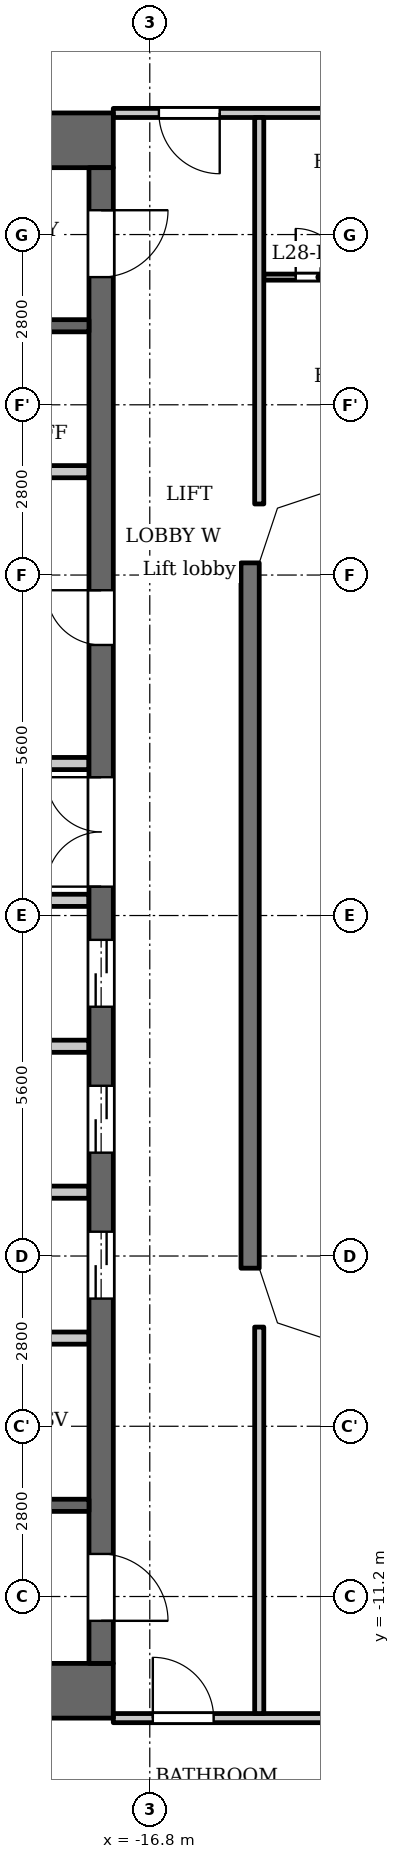
"""IFC4 building model, lengths in metres.
Left out: names, types, materials, properties, quantities, classifications, styles, units other than length and angle.
Written with IfcOpenShell. Run it as: python <this file> out.ifc"""

import sys

from ifc_helpers import new_model, si_unit, direction, frame, frame_2d, origin, place, context, subcontext, project, spatial, polyline, rectangle, outline, extrude, element, fill, save


model = new_model("IFC4")
c1 = context("Model", 3, precision=1e-05, world=origin(), true_north=direction((0.0, 1.0)))
c2 = subcontext(c1, "Body", "Model", "MODEL_VIEW")
j1 = project(units=[si_unit("LENGTHUNIT", "METRE"), si_unit("PLANEANGLEUNIT", "RADIAN")], contexts=[c1])
p1 = place(None, origin())
s1 = spatial("IfcSite", under=j1, at=p1, CompositionType="ELEMENT")
p2 = place(p1, origin())
s2 = spatial("IfcBuilding", under=s1, at=p2, CompositionType="ELEMENT")
p3 = place(p2, frame((0.0, 0.0, 111.3)))
s3 = spatial("IfcBuildingStorey", under=s2, at=p3, CompositionType="ELEMENT", Elevation=111.3)
p4 = place(p3, frame((-15.15, -5.8, 0.0), z_axis=(0.0, 0.0, 1.0), x_axis=(0.0, 1.0, 0.0)))
e1 = element("IfcWall", 1, at=p4, inside=s3, PredefinedType="SOLIDWALL", context=c2, shape_type="SweptSolid", body=[
    extrude(rectangle(XDim=11.6, YDim=0.3, at=frame_2d((5.8, 0.0))), origin(), (0.0, 0.0, 1.0), 3.2),
])
for number, where, z_axis, x_axis in (
    (2, (-17.4, 12.75, 0.0), (0.0, 0.0, 1.0), (-1.0, 0.0, 0.0)),
    (3, (-17.4, -12.75, 0.0), (0.0, 0.0, 1.0), (-1.0, 0.0, 0.0)),
):
    element("IfcWall", number, at=place(p3, frame(where, z_axis=z_axis, x_axis=x_axis)), inside=s3, PredefinedType="SHEAR", context=c2, shape_type="SweptSolid", body=[
        extrude(rectangle(XDim=10.4, YDim=0.9, at=frame_2d((5.2, 0.0))), origin(), (0.0, 0.0, 1.0), 3.2),
    ])
p5 = place(p3, frame((-17.6, -12.3, 0.0), z_axis=(0.0, 0.0, 1.0), x_axis=(0.0, 1.0, 0.0)))
e4 = element("IfcWall", 4, at=p5, inside=s3, PredefinedType="SHEAR", context=c2, shape_type="SweptSolid", body=[
    extrude(rectangle(XDim=24.6, YDim=0.4, at=frame_2d((12.3, 0.0))), origin(), (0.0, 0.0, 1.0), 3.2),
])
p6 = place(p5, frame((6.0, 0.0, 0.0)))
e5 = element("IfcOpeningElement", 5, at=p6, cuts=e4, PredefinedType="OPENING", context=c2, shape_type="SweptSolid", body=[
    extrude(rectangle(XDim=1.1, YDim=2.1, at=frame_2d((0.55, 1.05))), frame((0.0, 0.21, 0.0), z_axis=(0.0, -1.0, 0.0), x_axis=(1.0, 0.0, 0.0)), (0.0, 0.0, 1.0), 0.42),
])
p7 = place(p5, frame((8.4, 0.0, 0.0)))
e6 = element("IfcOpeningElement", 6, at=p7, cuts=e4, PredefinedType="OPENING", context=c2, shape_type="SweptSolid", body=[
    extrude(rectangle(XDim=1.1, YDim=2.1, at=frame_2d((0.55, 1.05))), frame((0.0, 0.21, 0.0), z_axis=(0.0, -1.0, 0.0), x_axis=(1.0, 0.0, 0.0)), (0.0, 0.0, 1.0), 0.42),
])
p8 = place(p5, frame((10.8, 0.0, 0.0)))
e7 = element("IfcOpeningElement", 7, at=p8, cuts=e4, PredefinedType="OPENING", context=c2, shape_type="SweptSolid", body=[
    extrude(rectangle(XDim=1.1, YDim=2.1, at=frame_2d((0.55, 1.05))), frame((0.0, 0.21, 0.0), z_axis=(0.0, -1.0, 0.0), x_axis=(1.0, 0.0, 0.0)), (0.0, 0.0, 1.0), 0.42),
])
p9 = place(p5, frame((16.75, 0.0, 0.0)))
e8 = element("IfcOpeningElement", 8, at=p9, cuts=e4, PredefinedType="OPENING", context=c2, shape_type="SweptSolid", body=[
    extrude(rectangle(XDim=0.9, YDim=2.1, at=frame_2d((0.45, 1.05))), frame((0.0, 0.21, 0.0), z_axis=(0.0, -1.0, 0.0), x_axis=(1.0, 0.0, 0.0)), (0.0, 0.0, 1.0), 0.42),
])
p10 = place(p5, frame((22.8, 0.0, 0.0)))
e9 = element("IfcOpeningElement", 9, at=p10, cuts=e4, PredefinedType="OPENING", context=c2, shape_type="SweptSolid", body=[
    extrude(rectangle(XDim=1.1, YDim=2.1, at=frame_2d((0.55, 1.05))), frame((0.0, 0.21, 0.0), z_axis=(0.0, -1.0, 0.0), x_axis=(1.0, 0.0, 0.0)), (0.0, 0.0, 1.0), 0.42),
])
p11 = place(p5, frame((0.7, 0.0, 0.0)))
e10 = element("IfcOpeningElement", 10, at=p11, cuts=e4, PredefinedType="OPENING", context=c2, shape_type="SweptSolid", body=[
    extrude(rectangle(XDim=1.1, YDim=2.1, at=frame_2d((0.55, 1.05))), frame((0.0, 0.21, 0.0), z_axis=(0.0, -1.0, 0.0), x_axis=(1.0, 0.0, 0.0)), (0.0, 0.0, 1.0), 0.42),
])
p12 = place(p5, frame((12.775, 0.0, 0.0)))
e11 = element("IfcOpeningElement", 11, at=p12, cuts=e4, PredefinedType="OPENING", context=c2, shape_type="SweptSolid", body=[
    extrude(rectangle(XDim=1.8, YDim=2.1, at=frame_2d((0.9, 1.05))), frame((0.0, 0.21, 0.0), z_axis=(0.0, -1.0, 0.0), x_axis=(1.0, 0.0, 0.0)), (0.0, 0.0, 1.0), 0.42),
])
p13 = place(p3, frame((-17.8, -9.7, 0.0), z_axis=(0.0, 0.0, 1.0), x_axis=(-1.0, 0.0, 0.0)))
e12 = element("IfcWall", 12, at=p13, inside=s3, PredefinedType="SHEAR", context=c2, shape_type="SweptSolid", body=[
    extrude(rectangle(XDim=8.3, YDim=0.2, at=frame_2d((4.15, 0.0))), origin(), (0.0, 0.0, 1.0), 3.2),
])
p14 = place(p13, frame((0.85, 0.0, 0.0)))
e13 = element("IfcOpeningElement", 13, at=p14, cuts=e12, PredefinedType="OPENING", context=c2, shape_type="SweptSolid", body=[
    extrude(rectangle(XDim=1.1, YDim=2.1, at=frame_2d((0.55, 1.05))), frame((0.0, 0.11, 0.0), z_axis=(0.0, -1.0, 0.0), x_axis=(1.0, 0.0, 0.0)), (0.0, 0.0, 1.0), 0.22),
])
p15 = place(p13, frame((3.75, 0.0, 0.0)))
e14 = element("IfcOpeningElement", 14, at=p15, cuts=e12, PredefinedType="OPENING", context=c2, shape_type="SweptSolid", body=[
    extrude(rectangle(XDim=1.1, YDim=2.1, at=frame_2d((0.55, 1.05))), frame((0.0, 0.11, 0.0), z_axis=(0.0, -1.0, 0.0), x_axis=(1.0, 0.0, 0.0)), (0.0, 0.0, 1.0), 0.22),
])
for number, where, z_axis, x_axis in (
    (15, (-17.8, -6.95, 0.0), (0.0, 0.0, 1.0), (-1.0, 0.0, 0.0)),
    (16, (-17.8, -4.55, 0.0), (0.0, 0.0, 1.0), (-1.0, 0.0, 0.0)),
    (17, (-17.8, -2.15, 0.0), (0.0, 0.0, 1.0), (-1.0, 0.0, 0.0)),
):
    element("IfcWall", number, at=place(p3, frame(where, z_axis=z_axis, x_axis=x_axis)), inside=s3, PredefinedType="PARTITIONING", context=c2, shape_type="SweptSolid", body=[
        extrude(rectangle(XDim=2.8, YDim=0.2, at=frame_2d((1.4, 0.0))), origin(), (0.0, 0.0, 1.0), 3.2),
    ])
for number, where, z_axis, x_axis in (
    (18, (-17.8, 0.25, 0.0), (0.0, 0.0, 1.0), (-1.0, 0.0, 0.0)),
    (19, (-17.8, 2.5, 0.0), (0.0, 0.0, 1.0), (-1.0, 0.0, 0.0)),
):
    element("IfcWall", number, at=place(p3, frame(where, z_axis=z_axis, x_axis=x_axis)), inside=s3, PredefinedType="PARTITIONING", context=c2, shape_type="SweptSolid", body=[
        extrude(rectangle(XDim=3.0, YDim=0.2, at=frame_2d((1.5, 0.0))), origin(), (0.0, 0.0, 1.0), 3.2),
    ])
p16 = place(p3, frame((-17.8, 7.3, 0.0), z_axis=(0.0, 0.0, 1.0), x_axis=(-1.0, 0.0, 0.0)))
e20 = element("IfcWall", 20, at=p16, inside=s3, PredefinedType="PARTITIONING", context=c2, shape_type="SweptSolid", body=[
    extrude(rectangle(XDim=2.8, YDim=0.2, at=frame_2d((1.4, 0.0))), origin(), (0.0, 0.0, 1.0), 3.2),
])
p17 = place(p3, frame((-17.8, 9.7, 0.0), z_axis=(0.0, 0.0, 1.0), x_axis=(-1.0, 0.0, 0.0)))
e21 = element("IfcWall", 21, at=p17, inside=s3, PredefinedType="SHEAR", context=c2, shape_type="SweptSolid", body=[
    extrude(rectangle(XDim=8.3, YDim=0.2, at=frame_2d((4.15, 0.0))), origin(), (0.0, 0.0, 1.0), 3.2),
])
p18 = place(p17, frame((0.85, 0.0, 0.0)))
e22 = element("IfcOpeningElement", 22, at=p18, cuts=e21, PredefinedType="OPENING", context=c2, shape_type="SweptSolid", body=[
    extrude(rectangle(XDim=1.1, YDim=2.1, at=frame_2d((0.55, 1.05))), frame((0.0, 0.11, 0.0), z_axis=(0.0, -1.0, 0.0), x_axis=(1.0, 0.0, 0.0)), (0.0, 0.0, 1.0), 0.22),
])
p19 = place(p17, frame((3.75, 0.0, 0.0)))
e23 = element("IfcOpeningElement", 23, at=p19, cuts=e21, PredefinedType="OPENING", context=c2, shape_type="SweptSolid", body=[
    extrude(rectangle(XDim=1.1, YDim=2.1, at=frame_2d((0.55, 1.05))), frame((0.0, 0.11, 0.0), z_axis=(0.0, -1.0, 0.0), x_axis=(1.0, 0.0, 0.0)), (0.0, 0.0, 1.0), 0.22),
])
p20 = place(p3, frame((-17.4, -13.2, 0.0), z_axis=(0.0, 0.0, 1.0), x_axis=(1.0, 0.0, 0.0)))
e24 = element("IfcWall", 24, at=p20, inside=s3, PredefinedType="PARTITIONING", context=c2, shape_type="SweptSolid", body=[
    extrude(rectangle(XDim=34.8, YDim=0.15, at=frame_2d((17.4, 0.0))), origin(), (0.0, 0.0, 1.0), 3.2),
])
p21 = place(p20, frame((0.65, 0.0, 0.0)))
e25 = element("IfcOpeningElement", 25, at=p21, cuts=e24, PredefinedType="OPENING", context=c2, shape_type="SweptSolid", body=[
    extrude(rectangle(XDim=1.0, YDim=2.1, at=frame_2d((0.5, 1.05))), frame((0.0, 0.085, 0.0), z_axis=(0.0, -1.0, 0.0), x_axis=(1.0, 0.0, 0.0)), (0.0, 0.0, 1.0), 0.17),
])
p22 = place(p20, frame((33.05, 0.0, 0.0)))
e26 = element("IfcOpeningElement", 26, at=p22, cuts=e24, PredefinedType="OPENING", context=c2, shape_type="SweptSolid", body=[
    extrude(rectangle(XDim=1.0, YDim=2.1, at=frame_2d((0.5, 1.05))), frame((0.0, 0.085, 0.0), z_axis=(0.0, -1.0, 0.0), x_axis=(1.0, 0.0, 0.0)), (0.0, 0.0, 1.0), 0.17),
])
p23 = place(p20, frame((4.55, 0.0, 0.0)))
e27 = element("IfcOpeningElement", 27, at=p23, cuts=e24, PredefinedType="OPENING", context=c2, shape_type="SweptSolid", body=[
    extrude(rectangle(XDim=1.0, YDim=2.1, at=frame_2d((0.5, 1.05))), frame((0.0, 0.085, 0.0), z_axis=(0.0, -1.0, 0.0), x_axis=(1.0, 0.0, 0.0)), (0.0, 0.0, 1.0), 0.17),
])
p24 = place(p20, frame((6.9, 0.0, 0.0)))
e28 = element("IfcOpeningElement", 28, at=p24, cuts=e24, PredefinedType="OPENING", context=c2, shape_type="SweptSolid", body=[
    extrude(rectangle(XDim=1.0, YDim=2.1, at=frame_2d((0.5, 1.05))), frame((0.0, 0.085, 0.0), z_axis=(0.0, -1.0, 0.0), x_axis=(1.0, 0.0, 0.0)), (0.0, 0.0, 1.0), 0.17),
])
p25 = place(p20, frame((15.75, 0.0, 0.0)))
e29 = element("IfcOpeningElement", 29, at=p25, cuts=e24, PredefinedType="OPENING", context=c2, shape_type="SweptSolid", body=[
    extrude(rectangle(XDim=1.0, YDim=2.1, at=frame_2d((0.5, 1.05))), frame((0.0, 0.085, 0.0), z_axis=(0.0, -1.0, 0.0), x_axis=(1.0, 0.0, 0.0)), (0.0, 0.0, 1.0), 0.17),
])
p26 = place(p20, frame((18.1, 0.0, 0.0)))
e30 = element("IfcOpeningElement", 30, at=p26, cuts=e24, PredefinedType="OPENING", context=c2, shape_type="SweptSolid", body=[
    extrude(rectangle(XDim=1.0, YDim=2.1, at=frame_2d((0.5, 1.05))), frame((0.0, 0.085, 0.0), z_axis=(0.0, -1.0, 0.0), x_axis=(1.0, 0.0, 0.0)), (0.0, 0.0, 1.0), 0.17),
])
p27 = place(p20, frame((26.95, 0.0, 0.0)))
e31 = element("IfcOpeningElement", 31, at=p27, cuts=e24, PredefinedType="OPENING", context=c2, shape_type="SweptSolid", body=[
    extrude(rectangle(XDim=1.0, YDim=2.1, at=frame_2d((0.5, 1.05))), frame((0.0, 0.085, 0.0), z_axis=(0.0, -1.0, 0.0), x_axis=(1.0, 0.0, 0.0)), (0.0, 0.0, 1.0), 0.17),
])
p28 = place(p20, frame((29.25, 0.0, 0.0)))
e32 = element("IfcOpeningElement", 32, at=p28, cuts=e24, PredefinedType="OPENING", context=c2, shape_type="SweptSolid", body=[
    extrude(rectangle(XDim=1.0, YDim=2.1, at=frame_2d((0.5, 1.05))), frame((0.0, 0.085, 0.0), z_axis=(0.0, -1.0, 0.0), x_axis=(1.0, 0.0, 0.0)), (0.0, 0.0, 1.0), 0.17),
])
p29 = place(p3, frame((-14.925, 10.5, 0.0), z_axis=(0.0, 0.0, 1.0), x_axis=(1.0, 0.0, 0.0)))
e33 = element("IfcWall", 33, at=p29, inside=s3, PredefinedType="PARTITIONING", context=c2, shape_type="SweptSolid", body=[
    extrude(rectangle(XDim=29.85, YDim=0.1, at=frame_2d((14.925, 0.0))), origin(), (0.0, 0.0, 1.0), 3.2),
])
p30 = place(p29, frame((0.525, 0.0, 0.0)))
e34 = element("IfcOpeningElement", 34, at=p30, cuts=e33, PredefinedType="OPENING", context=c2, shape_type="SweptSolid", body=[
    extrude(rectangle(XDim=0.8, YDim=2.1, at=frame_2d((0.4, 1.05))), frame((0.0, 0.06, 0.0), z_axis=(0.0, -1.0, 0.0), x_axis=(1.0, 0.0, 0.0)), (0.0, 0.0, 1.0), 0.12),
])
p31 = place(p29, frame((4.375, 0.0, 0.0)))
e35 = element("IfcOpeningElement", 35, at=p31, cuts=e33, PredefinedType="OPENING", context=c2, shape_type="SweptSolid", body=[
    extrude(rectangle(XDim=0.9, YDim=2.1, at=frame_2d((0.45, 1.05))), frame((0.0, 0.06, 0.0), z_axis=(0.0, -1.0, 0.0), x_axis=(1.0, 0.0, 0.0)), (0.0, 0.0, 1.0), 0.12),
])
p32 = place(p29, frame((18.825, 0.0, 0.0)))
e36 = element("IfcOpeningElement", 36, at=p32, cuts=e33, PredefinedType="OPENING", context=c2, shape_type="SweptSolid", body=[
    extrude(rectangle(XDim=0.8, YDim=2.1, at=frame_2d((0.4, 1.05))), frame((0.0, 0.06, 0.0), z_axis=(0.0, -1.0, 0.0), x_axis=(1.0, 0.0, 0.0)), (0.0, 0.0, 1.0), 0.12),
])
p33 = place(p29, frame((16.325, 0.0, 0.0)))
e37 = element("IfcOpeningElement", 37, at=p33, cuts=e33, PredefinedType="OPENING", context=c2, shape_type="SweptSolid", body=[
    extrude(rectangle(XDim=0.9, YDim=2.1, at=frame_2d((0.45, 1.05))), frame((0.0, 0.06, 0.0), z_axis=(0.0, -1.0, 0.0), x_axis=(1.0, 0.0, 0.0)), (0.0, 0.0, 1.0), 0.12),
])
p34 = place(p29, frame((10.225, 0.0, 0.0)))
e38 = element("IfcOpeningElement", 38, at=p34, cuts=e33, PredefinedType="OPENING", context=c2, shape_type="SweptSolid", body=[
    extrude(rectangle(XDim=0.9, YDim=2.1, at=frame_2d((0.45, 1.05))), frame((0.0, 0.06, 0.0), z_axis=(0.0, -1.0, 0.0), x_axis=(1.0, 0.0, 0.0)), (0.0, 0.0, 1.0), 0.12),
])
p35 = place(p29, frame((13.325, 0.0, 0.0)))
e39 = element("IfcOpeningElement", 39, at=p35, cuts=e33, PredefinedType="OPENING", context=c2, shape_type="SweptSolid", body=[
    extrude(rectangle(XDim=0.9, YDim=2.1, at=frame_2d((0.45, 1.05))), frame((0.0, 0.06, 0.0), z_axis=(0.0, -1.0, 0.0), x_axis=(1.0, 0.0, 0.0)), (0.0, 0.0, 1.0), 0.12),
])
p36 = place(p29, frame((21.175, 0.0, 0.0)))
e40 = element("IfcOpeningElement", 40, at=p36, cuts=e33, PredefinedType="OPENING", context=c2, shape_type="SweptSolid", body=[
    extrude(rectangle(XDim=0.8, YDim=2.1, at=frame_2d((0.4, 1.05))), frame((0.0, 0.06, 0.0), z_axis=(0.0, -1.0, 0.0), x_axis=(1.0, 0.0, 0.0)), (0.0, 0.0, 1.0), 0.12),
])
p37 = place(p29, frame((26.775, 0.0, 0.0)))
e41 = element("IfcOpeningElement", 41, at=p37, cuts=e33, PredefinedType="OPENING", context=c2, shape_type="SweptSolid", body=[
    extrude(rectangle(XDim=0.9, YDim=2.1, at=frame_2d((0.45, 1.05))), frame((0.0, 0.06, 0.0), z_axis=(0.0, -1.0, 0.0), x_axis=(1.0, 0.0, 0.0)), (0.0, 0.0, 1.0), 0.12),
])
p38 = place(p3, frame((-17.4, 13.2, 0.0), z_axis=(0.0, 0.0, 1.0), x_axis=(1.0, 0.0, 0.0)))
e42 = element("IfcWall", 42, at=p38, inside=s3, PredefinedType="PARTITIONING", context=c2, shape_type="SweptSolid", body=[
    extrude(rectangle(XDim=34.8, YDim=0.15, at=frame_2d((17.4, 0.0))), origin(), (0.0, 0.0, 1.0), 3.2),
])
p39 = place(p38, frame((0.75, 0.0, 0.0)))
e43 = element("IfcOpeningElement", 43, at=p39, cuts=e42, PredefinedType="OPENING", context=c2, shape_type="SweptSolid", body=[
    extrude(rectangle(XDim=1.0, YDim=2.1, at=frame_2d((0.5, 1.05))), frame((0.0, 0.085, 0.0), z_axis=(0.0, -1.0, 0.0), x_axis=(1.0, 0.0, 0.0)), (0.0, 0.0, 1.0), 0.17),
])
p40 = place(p38, frame((33.15, 0.0, 0.0)))
e44 = element("IfcOpeningElement", 44, at=p40, cuts=e42, PredefinedType="OPENING", context=c2, shape_type="SweptSolid", body=[
    extrude(rectangle(XDim=1.0, YDim=2.1, at=frame_2d((0.5, 1.05))), frame((0.0, 0.085, 0.0), z_axis=(0.0, -1.0, 0.0), x_axis=(1.0, 0.0, 0.0)), (0.0, 0.0, 1.0), 0.17),
])
p41 = place(p38, frame((6.85, 0.0, 0.0)))
e45 = element("IfcOpeningElement", 45, at=p41, cuts=e42, PredefinedType="OPENING", context=c2, shape_type="SweptSolid", body=[
    extrude(rectangle(XDim=1.0, YDim=2.1, at=frame_2d((0.5, 1.05))), frame((0.0, 0.085, 0.0), z_axis=(0.0, -1.0, 0.0), x_axis=(1.0, 0.0, 0.0)), (0.0, 0.0, 1.0), 0.17),
])
p42 = place(p38, frame((12.45, 0.0, 0.0)))
e46 = element("IfcOpeningElement", 46, at=p42, cuts=e42, PredefinedType="OPENING", context=c2, shape_type="SweptSolid", body=[
    extrude(rectangle(XDim=1.0, YDim=2.1, at=frame_2d((0.5, 1.05))), frame((0.0, 0.085, 0.0), z_axis=(0.0, -1.0, 0.0), x_axis=(1.0, 0.0, 0.0)), (0.0, 0.0, 1.0), 0.17),
])
p43 = place(p38, frame((29.25, 0.0, 0.0)))
e47 = element("IfcOpeningElement", 47, at=p43, cuts=e42, PredefinedType="OPENING", context=c2, shape_type="SweptSolid", body=[
    extrude(rectangle(XDim=1.0, YDim=2.1, at=frame_2d((0.5, 1.05))), frame((0.0, 0.085, 0.0), z_axis=(0.0, -1.0, 0.0), x_axis=(1.0, 0.0, 0.0)), (0.0, 0.0, 1.0), 0.17),
])
for number, where, z_axis, x_axis in (
    (48, (-15.0, -13.125, 0.0), (0.0, 0.0, 1.0), (0.0, 1.0, 0.0)),
    (49, (-15.0, 6.769, 0.0), (0.0, 0.0, 1.0), (0.0, 1.0, 0.0)),
):
    element("IfcWall", number, at=place(p3, frame(where, z_axis=z_axis, x_axis=x_axis)), inside=s3, PredefinedType="PARTITIONING", context=c2, shape_type="SweptSolid", body=[
        extrude(rectangle(XDim=6.356, YDim=0.15, at=frame_2d((3.178, 0.0))), origin(), (0.0, 0.0, 1.0), 3.2),
    ])
p44 = place(p3, origin())
e50 = element("IfcWall", 50, at=p44, inside=s3, PredefinedType="SOLIDWALL", context=c2, shape_type="SweptSolid", body=[
    extrude(outline(polyline([(-13.849, 7.3), (-14.937, 6.937), (-15.3, 5.849), (-15.3, 5.8), (-15.0, 5.8), (-14.7, 6.7), (-13.8, 7.0), (-13.8, 7.3), (-13.849, 7.3)])), origin(), (0.0, 0.0, 1.0), 3.2),
])
e51 = element("IfcWall", 51, at=p44, inside=s3, PredefinedType="SOLIDWALL", context=c2, shape_type="SweptSolid", body=[
    extrude(outline(polyline([(-14.937, -6.937), (-13.849, -7.3), (-13.8, -7.3), (-13.8, -7.0), (-14.7, -6.7), (-15.0, -5.8), (-15.3, -5.8), (-15.3, -5.849), (-14.937, -6.937)])), origin(), (0.0, 0.0, 1.0), 3.2),
])
p45 = place(p6, origin())
e52 = element("IfcDoor", 52, at=p45, inside=s3, OperationType="DOUBLE_DOOR_SLIDING", PredefinedType="DOOR", context=c2, shape_type="SweptSolid", body=[
    extrude(rectangle(XDim=1.1, YDim=2.1, at=frame_2d((0.55, 1.05))), frame((0.0, 0.025, 0.0), z_axis=(0.0, -1.0, 0.0), x_axis=(1.0, 0.0, 0.0)), (0.0, 0.0, 1.0), 0.05),
])
fill(e5, e52)
p46 = place(p7, origin())
e53 = element("IfcDoor", 53, at=p46, inside=s3, OperationType="DOUBLE_DOOR_SLIDING", PredefinedType="DOOR", context=c2, shape_type="SweptSolid", body=[
    extrude(rectangle(XDim=1.1, YDim=2.1, at=frame_2d((0.55, 1.05))), frame((0.0, 0.025, 0.0), z_axis=(0.0, -1.0, 0.0), x_axis=(1.0, 0.0, 0.0)), (0.0, 0.0, 1.0), 0.05),
])
fill(e6, e53)
p47 = place(p8, origin())
e54 = element("IfcDoor", 54, at=p47, inside=s3, OperationType="DOUBLE_DOOR_SLIDING", PredefinedType="DOOR", context=c2, shape_type="SweptSolid", body=[
    extrude(rectangle(XDim=1.1, YDim=2.1, at=frame_2d((0.55, 1.05))), frame((0.0, 0.025, 0.0), z_axis=(0.0, -1.0, 0.0), x_axis=(1.0, 0.0, 0.0)), (0.0, 0.0, 1.0), 0.05),
])
fill(e7, e54)
p48 = place(p9, origin())
e55 = element("IfcDoor", 55, at=p48, inside=s3, OperationType="SINGLE_SWING_LEFT", PredefinedType="DOOR", context=c2, shape_type="SweptSolid", body=[
    extrude(rectangle(XDim=0.9, YDim=2.1, at=frame_2d((0.45, 1.05))), frame((0.0, 0.025, 0.0), z_axis=(0.0, -1.0, 0.0), x_axis=(1.0, 0.0, 0.0)), (0.0, 0.0, 1.0), 0.05),
])
fill(e8, e55)
p49 = place(p10, origin())
e56 = element("IfcDoor", 56, at=p49, inside=s3, OperationType="SINGLE_SWING_RIGHT", PredefinedType="DOOR", context=c2, shape_type="SweptSolid", body=[
    extrude(rectangle(XDim=1.1, YDim=2.1, at=frame_2d((0.55, 1.05))), frame((0.0, 0.025, 0.0), z_axis=(0.0, -1.0, 0.0), x_axis=(1.0, 0.0, 0.0)), (0.0, 0.0, 1.0), 0.05),
])
fill(e9, e56)
p50 = place(p11, origin())
e57 = element("IfcDoor", 57, at=p50, inside=s3, OperationType="SINGLE_SWING_LEFT", PredefinedType="DOOR", context=c2, shape_type="SweptSolid", body=[
    extrude(rectangle(XDim=1.1, YDim=2.1, at=frame_2d((0.55, 1.05))), frame((0.0, 0.025, 0.0), z_axis=(0.0, -1.0, 0.0), x_axis=(1.0, 0.0, 0.0)), (0.0, 0.0, 1.0), 0.05),
])
fill(e10, e57)
p51 = place(p12, origin())
e58 = element("IfcDoor", 58, at=p51, inside=s3, OperationType="DOUBLE_DOOR_SINGLE_SWING", PredefinedType="DOOR", context=c2, shape_type="SweptSolid", body=[
    extrude(rectangle(XDim=1.8, YDim=2.1, at=frame_2d((0.9, 1.05))), frame((0.0, 0.025, 0.0), z_axis=(0.0, -1.0, 0.0), x_axis=(1.0, 0.0, 0.0)), (0.0, 0.0, 1.0), 0.05),
])
fill(e11, e58)
p52 = place(p39, origin())
e59 = element("IfcDoor", 59, at=p52, inside=s3, OperationType="SINGLE_SWING_RIGHT", PredefinedType="DOOR", context=c2, shape_type="SweptSolid", body=[
    extrude(rectangle(XDim=1.0, YDim=2.1, at=frame_2d((0.5, 1.05))), frame((0.0, 0.025, 0.0), z_axis=(0.0, -1.0, 0.0), x_axis=(1.0, 0.0, 0.0)), (0.0, 0.0, 1.0), 0.05),
])
fill(e43, e59)
p53 = place(p21, origin())
e60 = element("IfcDoor", 60, at=p53, inside=s3, OperationType="SINGLE_SWING_RIGHT", PredefinedType="DOOR", context=c2, shape_type="SweptSolid", body=[
    extrude(rectangle(XDim=1.0, YDim=2.1, at=frame_2d((0.5, 1.05))), frame((0.0, 0.025, 0.0), z_axis=(0.0, -1.0, 0.0), x_axis=(1.0, 0.0, 0.0)), (0.0, 0.0, 1.0), 0.05),
])
fill(e25, e60)
p54 = place(p30, origin())
e61 = element("IfcDoor", 61, at=p54, inside=s3, OperationType="SINGLE_SWING_RIGHT", PredefinedType="DOOR", context=c2, shape_type="SweptSolid", body=[
    extrude(rectangle(XDim=0.8, YDim=2.1, at=frame_2d((0.4, 1.05))), frame((0.0, 0.025, 0.0), z_axis=(0.0, -1.0, 0.0), x_axis=(1.0, 0.0, 0.0)), (0.0, 0.0, 1.0), 0.05),
])
fill(e34, e61)
save(model, sys.argv[1])
